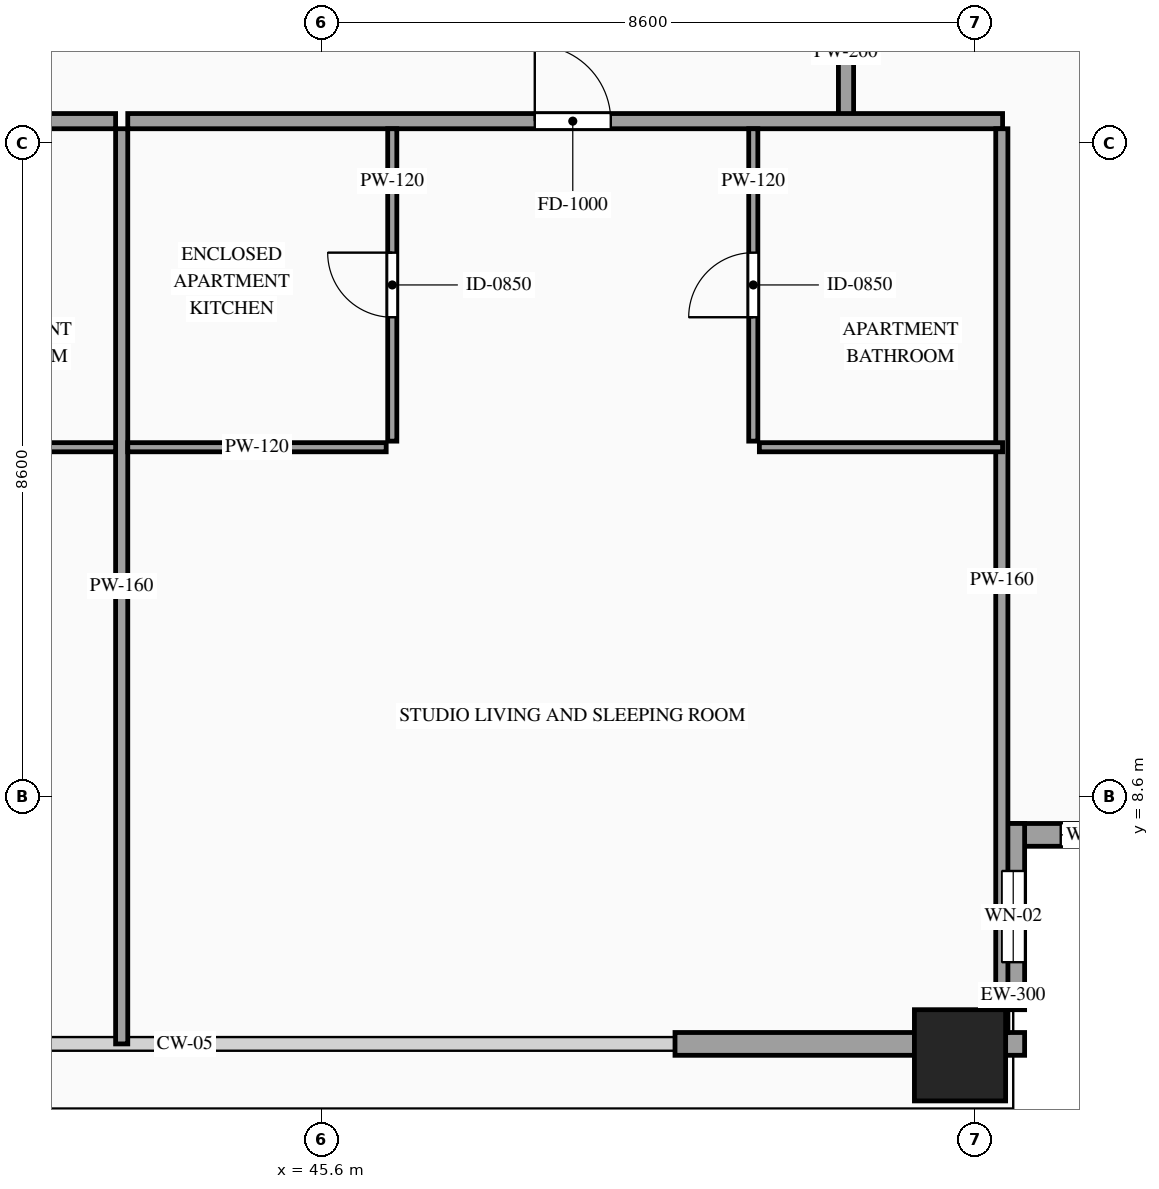
"""IFC4 building model, lengths in metres.
Left out: names, types, materials, properties, quantities, classifications, styles, units other than length and angle.
Written with IfcOpenShell. Run it as: python <this file> out.ifc"""

import sys

from ifc_helpers import new_model, si_unit, direction, frame, frame_2d, origin, origin_2d, place, context, subcontext, project, spatial, rectangle, hollow_rectangle, extrude, source, transform, mapped, element, fill, save


model = new_model("IFC4")
c1 = context("Model", 3, precision=1e-05, world=origin(), true_north=direction((0.0, 1.0)))
c2 = subcontext(c1, "Body", "Model", "MODEL_VIEW")
j1 = project(units=[si_unit("LENGTHUNIT", "METRE"), si_unit("PLANEANGLEUNIT", "RADIAN")], contexts=[c1])
p1 = place(None, origin())
s1 = spatial("IfcSite", under=j1, at=p1, CompositionType="ELEMENT")
p2 = place(p1, origin())
s2 = spatial("IfcBuilding", under=s1, at=p2, CompositionType="ELEMENT")
p3 = place(p2, frame((0.0, 0.0, 275.1)))
s3 = spatial("IfcBuildingStorey", under=s2, at=p3, CompositionType="ELEMENT", Elevation=275.1)
m1 = source(origin(), c2, "Body", "SweptSolid", [
    extrude(hollow_rectangle(XDim=1.2, YDim=1.2, WallThickness=0.055, at=origin_2d()), origin(), (0.0, 0.0, 1.0), 3.5),
])
p4 = place(p3, frame((54.0, 5.2, 0.0), z_axis=(0.0, 0.0, 1.0), x_axis=(1.0, 0.0, 0.0)))
e1 = element("IfcColumn", 1, at=p4, inside=s3, PredefinedType="COLUMN", context=c2, shape_type="MappedRepresentation", body=[
    mapped(m1, transform((0.0, 0.0, 0.0), scale=1.0)),
])
p5 = place(p3, frame((54.55, 8.1, 0.0), z_axis=(0.0, 0.0, 1.0), x_axis=(1.0, 0.0, 0.0)))
e2 = element("IfcWall", 2, at=p5, inside=s3, PredefinedType="SOLIDWALL", context=c2, shape_type="SweptSolid", body=[
    extrude(rectangle(XDim=2.45, YDim=0.3, at=frame_2d((1.225, 0.0))), origin(), (0.0, 0.0, 1.0), 3.28),
])
p6 = place(p5, frame((0.775, 0.0, 0.85)))
e3 = element("IfcOpeningElement", 3, at=p6, cuts=e2, PredefinedType="OPENING", context=c2, shape_type="SweptSolid", body=[
    extrude(rectangle(XDim=0.9, YDim=1.5, at=frame_2d((0.45, 0.75))), frame((0.0, 0.165, 0.0), z_axis=(0.0, -1.0, 0.0), x_axis=(1.0, 0.0, 0.0)), (0.0, 0.0, 1.0), 0.33),
])
p7 = place(p3, frame((54.7, 5.8, 0.0), z_axis=(0.0, 0.0, 1.0), x_axis=(0.0, 1.0, 0.0)))
e4 = element("IfcWall", 4, at=p7, inside=s3, PredefinedType="SOLIDWALL", context=c2, shape_type="SweptSolid", body=[
    extrude(rectangle(XDim=2.45, YDim=0.3, at=frame_2d((1.225, 0.0))), origin(), (0.0, 0.0, 1.0), 3.28),
])
p8 = place(p7, frame((0.625, 0.0, 0.85)))
e5 = element("IfcOpeningElement", 5, at=p8, cuts=e4, PredefinedType="OPENING", context=c2, shape_type="SweptSolid", body=[
    extrude(rectangle(XDim=1.2, YDim=2.1, at=frame_2d((0.6, 1.05))), frame((0.0, 0.165, 0.0), z_axis=(0.0, -1.0, 0.0), x_axis=(1.0, 0.0, 0.0)), (0.0, 0.0, 1.0), 0.33),
])
m2 = source(origin(), c2, "Body", "SweptSolid", [
    extrude(rectangle(XDim=0.25, YDim=0.3, at=frame_2d((0.125, 0.0))), origin(), (0.0, 0.0, 1.0), 3.28),
])
p9 = place(p3, frame((54.6, 5.35, 0.0), z_axis=(0.0, 0.0, 1.0), x_axis=(1.0, 0.0, 0.0)))
e6 = element("IfcWall", 6, at=p9, inside=s3, PredefinedType="SOLIDWALL", context=c2, shape_type="MappedRepresentation", body=[
    mapped(m2, transform((0.0, 0.0, 0.0), scale=1.0)),
])
m3 = source(origin(), c2, "Body", "SweptSolid", [
    extrude(rectangle(XDim=3.15, YDim=0.3, at=frame_2d((1.575, 0.0))), origin(), (0.0, 0.0, 1.0), 2.835),
])
p10 = place(p3, frame((50.25, 5.35, 0.0), z_axis=(0.0, 0.0, 1.0), x_axis=(1.0, 0.0, 0.0)))
e7 = element("IfcWall", 7, at=p10, inside=s3, PredefinedType="SOLIDWALL", context=c2, shape_type="MappedRepresentation", body=[
    mapped(m3, transform((0.0, 0.0, 0.0), scale=1.0)),
])
m4 = source(origin(), c2, "Body", "SweptSolid", [
    extrude(rectangle(XDim=1.7, YDim=0.2, at=frame_2d((0.85, 0.0))), origin(), (0.0, 0.0, 1.0), 3.28),
])
p11 = place(p3, frame((52.5, 17.55, 0.0), z_axis=(0.0, 0.0, 1.0), x_axis=(0.0, 1.0, 0.0)))
e8 = element("IfcWall", 8, at=p11, inside=s3, PredefinedType="PARTITIONING", context=c2, shape_type="MappedRepresentation", body=[
    mapped(m4, transform((0.0, 0.0, 0.0), scale=1.0)),
])
p12 = place(p3, frame((31.461, 17.49, 0.0), z_axis=(0.0, 0.0, 1.0), x_axis=(1.0, 0.0, 0.0)))
e9 = element("IfcWall", 9, at=p12, inside=s3, PredefinedType="PARTITIONING", context=c2, shape_type="SweptSolid", body=[
    extrude(rectangle(XDim=11.429, YDim=0.2, at=frame_2d((5.714, 0.0))), origin(), (0.0, 0.0, 1.0), 3.28),
])
p13 = place(p12, frame((5.314, 0.0, 0.0)))
e10 = element("IfcOpeningElement", 10, at=p13, cuts=e9, PredefinedType="OPENING", context=c2, shape_type="SweptSolid", body=[
    extrude(rectangle(XDim=1.0, YDim=2.2, at=frame_2d((0.5, 1.1))), frame((0.0, 0.115, 0.0), z_axis=(0.0, -1.0, 0.0), x_axis=(1.0, 0.0, 0.0)), (0.0, 0.0, 1.0), 0.23),
])
m5 = source(origin(), c2, "Body", "SweptSolid", [
    extrude(rectangle(XDim=12.04, YDim=0.16, at=frame_2d((6.02, 0.0))), origin(), (0.0, 0.0, 1.0), 3.28),
])
p14 = place(p3, frame((42.97, 5.35, 0.0), z_axis=(0.0, 0.0, 1.0), x_axis=(0.0, 1.0, 0.0)))
e11 = element("IfcWall", 11, at=p14, inside=s3, PredefinedType="PARTITIONING", context=c2, shape_type="MappedRepresentation", body=[
    mapped(m5, transform((0.0, 0.0, 0.0), scale=1.0)),
])
m6 = source(origin(), c2, "Body", "SweptSolid", [
    extrude(rectangle(XDim=3.2, YDim=0.12, at=frame_2d((1.6, 0.0))), origin(), (0.0, 0.0, 1.0), 3.28),
])
p15 = place(p3, frame((39.69, 13.2, 0.0), z_axis=(0.0, 0.0, 1.0), x_axis=(1.0, 0.0, 0.0)))
e12 = element("IfcWall", 12, at=p15, inside=s3, PredefinedType="PARTITIONING", context=c2, shape_type="MappedRepresentation", body=[
    mapped(m6, transform((0.0, 0.0, 0.0), scale=1.0)),
])
p16 = place(p3, frame((43.05, 17.49, 0.0), z_axis=(0.0, 0.0, 1.0), x_axis=(1.0, 0.0, 0.0)))
e13 = element("IfcWall", 13, at=p16, inside=s3, PredefinedType="PARTITIONING", context=c2, shape_type="SweptSolid", body=[
    extrude(rectangle(XDim=11.51, YDim=0.2, at=frame_2d((5.755, 0.0))), origin(), (0.0, 0.0, 1.0), 3.28),
])
p17 = place(p16, frame((5.355, 0.0, 0.0)))
e14 = element("IfcOpeningElement", 14, at=p17, cuts=e13, PredefinedType="OPENING", context=c2, shape_type="SweptSolid", body=[
    extrude(rectangle(XDim=1.0, YDim=2.2, at=frame_2d((0.5, 1.1))), frame((0.0, 0.115, 0.0), z_axis=(0.0, -1.0, 0.0), x_axis=(1.0, 0.0, 0.0)), (0.0, 0.0, 1.0), 0.23),
])
m7 = source(origin(), c2, "Body", "SweptSolid", [
    extrude(rectangle(XDim=11.89, YDim=0.16, at=frame_2d((5.945, 0.0))), origin(), (0.0, 0.0, 1.0), 3.28),
])
p18 = place(p3, frame((54.55, 5.5, 0.0), z_axis=(0.0, 0.0, 1.0), x_axis=(0.0, 1.0, 0.0)))
e15 = element("IfcWall", 15, at=p18, inside=s3, PredefinedType="PARTITIONING", context=c2, shape_type="MappedRepresentation", body=[
    mapped(m7, transform((0.0, 0.0, 0.0), scale=1.0)),
])
m8 = source(origin(), c2, "Body", "SweptSolid", [
    extrude(rectangle(XDim=3.4, YDim=0.12, at=frame_2d((1.7, 0.0))), origin(), (0.0, 0.0, 1.0), 3.28),
])
p19 = place(p3, frame((43.05, 13.2, 0.0), z_axis=(0.0, 0.0, 1.0), x_axis=(1.0, 0.0, 0.0)))
e16 = element("IfcWall", 16, at=p19, inside=s3, PredefinedType="PARTITIONING", context=c2, shape_type="MappedRepresentation", body=[
    mapped(m8, transform((0.0, 0.0, 0.0), scale=1.0)),
])
p20 = place(p3, frame((46.53, 13.28, 0.0), z_axis=(0.0, 0.0, 1.0), x_axis=(0.0, 1.0, 0.0)))
e17 = element("IfcWall", 17, at=p20, inside=s3, PredefinedType="PARTITIONING", context=c2, shape_type="SweptSolid", body=[
    extrude(rectangle(XDim=4.11, YDim=0.12, at=frame_2d((2.055, 0.0))), origin(), (0.0, 0.0, 1.0), 3.28),
])
p21 = place(p20, frame((1.63, 0.0, 0.0)))
e18 = element("IfcOpeningElement", 18, at=p21, cuts=e17, PredefinedType="OPENING", context=c2, shape_type="SweptSolid", body=[
    extrude(rectangle(XDim=0.85, YDim=2.1, at=frame_2d((0.425, 1.05))), frame((0.0, 0.075, 0.0), z_axis=(0.0, -1.0, 0.0), x_axis=(1.0, 0.0, 0.0)), (0.0, 0.0, 1.0), 0.15),
])
p22 = place(p3, frame((51.36, 13.2, 0.0), z_axis=(0.0, 0.0, 1.0), x_axis=(1.0, 0.0, 0.0)))
e19 = element("IfcWall", 19, at=p22, inside=s3, PredefinedType="PARTITIONING", context=c2, shape_type="MappedRepresentation", body=[
    mapped(m6, transform((0.0, 0.0, 0.0), scale=1.0)),
])
p23 = place(p3, frame((51.28, 13.28, 0.0), z_axis=(0.0, 0.0, 1.0), x_axis=(0.0, 1.0, 0.0)))
e20 = element("IfcWall", 20, at=p23, inside=s3, PredefinedType="PARTITIONING", context=c2, shape_type="SweptSolid", body=[
    extrude(rectangle(XDim=4.11, YDim=0.12, at=frame_2d((2.055, 0.0))), origin(), (0.0, 0.0, 1.0), 3.28),
])
p24 = place(p23, frame((1.63, 0.0, 0.0)))
e21 = element("IfcOpeningElement", 21, at=p24, cuts=e20, PredefinedType="OPENING", context=c2, shape_type="SweptSolid", body=[
    extrude(rectangle(XDim=0.85, YDim=2.1, at=frame_2d((0.425, 1.05))), frame((0.0, 0.075, 0.0), z_axis=(0.0, -1.0, 0.0), x_axis=(1.0, 0.0, 0.0)), (0.0, 0.0, 1.0), 0.15),
])
m9 = source(origin(), c2, "Body", "SweptSolid", [
    extrude(rectangle(XDim=0.9, YDim=1.5, at=frame_2d((0.45, 0.75))), frame((0.0, 0.03, 0.0), z_axis=(0.0, -1.0, 0.0), x_axis=(1.0, 0.0, 0.0)), (0.0, 0.0, 1.0), 0.06),
])
p25 = place(p6, origin())
e22 = element("IfcWindow", 22, at=p25, inside=s3, PartitioningType="SINGLE_PANEL", PredefinedType="WINDOW", context=c2, shape_type="MappedRepresentation", body=[
    mapped(m9, transform((0.0, 0.0, 0.0), scale=1.0)),
])
fill(e3, e22)
m10 = source(origin(), c2, "Body", "SweptSolid", [
    extrude(rectangle(XDim=1.2, YDim=2.1, at=frame_2d((0.6, 1.05))), frame((0.0, 0.03, 0.0), z_axis=(0.0, -1.0, 0.0), x_axis=(1.0, 0.0, 0.0)), (0.0, 0.0, 1.0), 0.06),
])
p26 = place(p8, origin())
e23 = element("IfcWindow", 23, at=p26, inside=s3, PartitioningType="SINGLE_PANEL", PredefinedType="WINDOW", context=c2, shape_type="MappedRepresentation", body=[
    mapped(m10, transform((0.0, 0.0, 0.0), scale=1.0)),
])
fill(e5, e23)
m11 = source(origin(), c2, "Body", "SweptSolid", [
    extrude(rectangle(XDim=1.0, YDim=2.2, at=frame_2d((0.5, 1.1))), frame((0.0, 0.025, 0.0), z_axis=(0.0, -1.0, 0.0), x_axis=(1.0, 0.0, 0.0)), (0.0, 0.0, 1.0), 0.05),
])
p27 = place(p17, origin())
e24 = element("IfcDoor", 24, at=p27, inside=s3, OperationType="SINGLE_SWING_LEFT", PredefinedType="DOOR", context=c2, shape_type="MappedRepresentation", body=[
    mapped(m11, transform((0.0, 0.0, 0.0), scale=1.0)),
])
fill(e14, e24)
m12 = source(origin(), c2, "Body", "SweptSolid", [
    extrude(rectangle(XDim=0.85, YDim=2.1, at=frame_2d((0.425, 1.05))), frame((0.0, 0.025, 0.0), z_axis=(0.0, -1.0, 0.0), x_axis=(1.0, 0.0, 0.0)), (0.0, 0.0, 1.0), 0.05),
])
p28 = place(p21, origin())
e25 = element("IfcDoor", 25, at=p28, inside=s3, OperationType="SINGLE_SWING_RIGHT", PredefinedType="DOOR", context=c2, shape_type="MappedRepresentation", body=[
    mapped(m12, transform((0.0, 0.0, 0.0), scale=1.0)),
])
fill(e18, e25)
p29 = place(p24, origin())
e26 = element("IfcDoor", 26, at=p29, inside=s3, OperationType="SINGLE_SWING_LEFT", PredefinedType="DOOR", context=c2, shape_type="MappedRepresentation", body=[
    mapped(m12, transform((0.0, 0.0, 0.0), scale=1.0)),
])
fill(e21, e26)
save(model, sys.argv[1])
